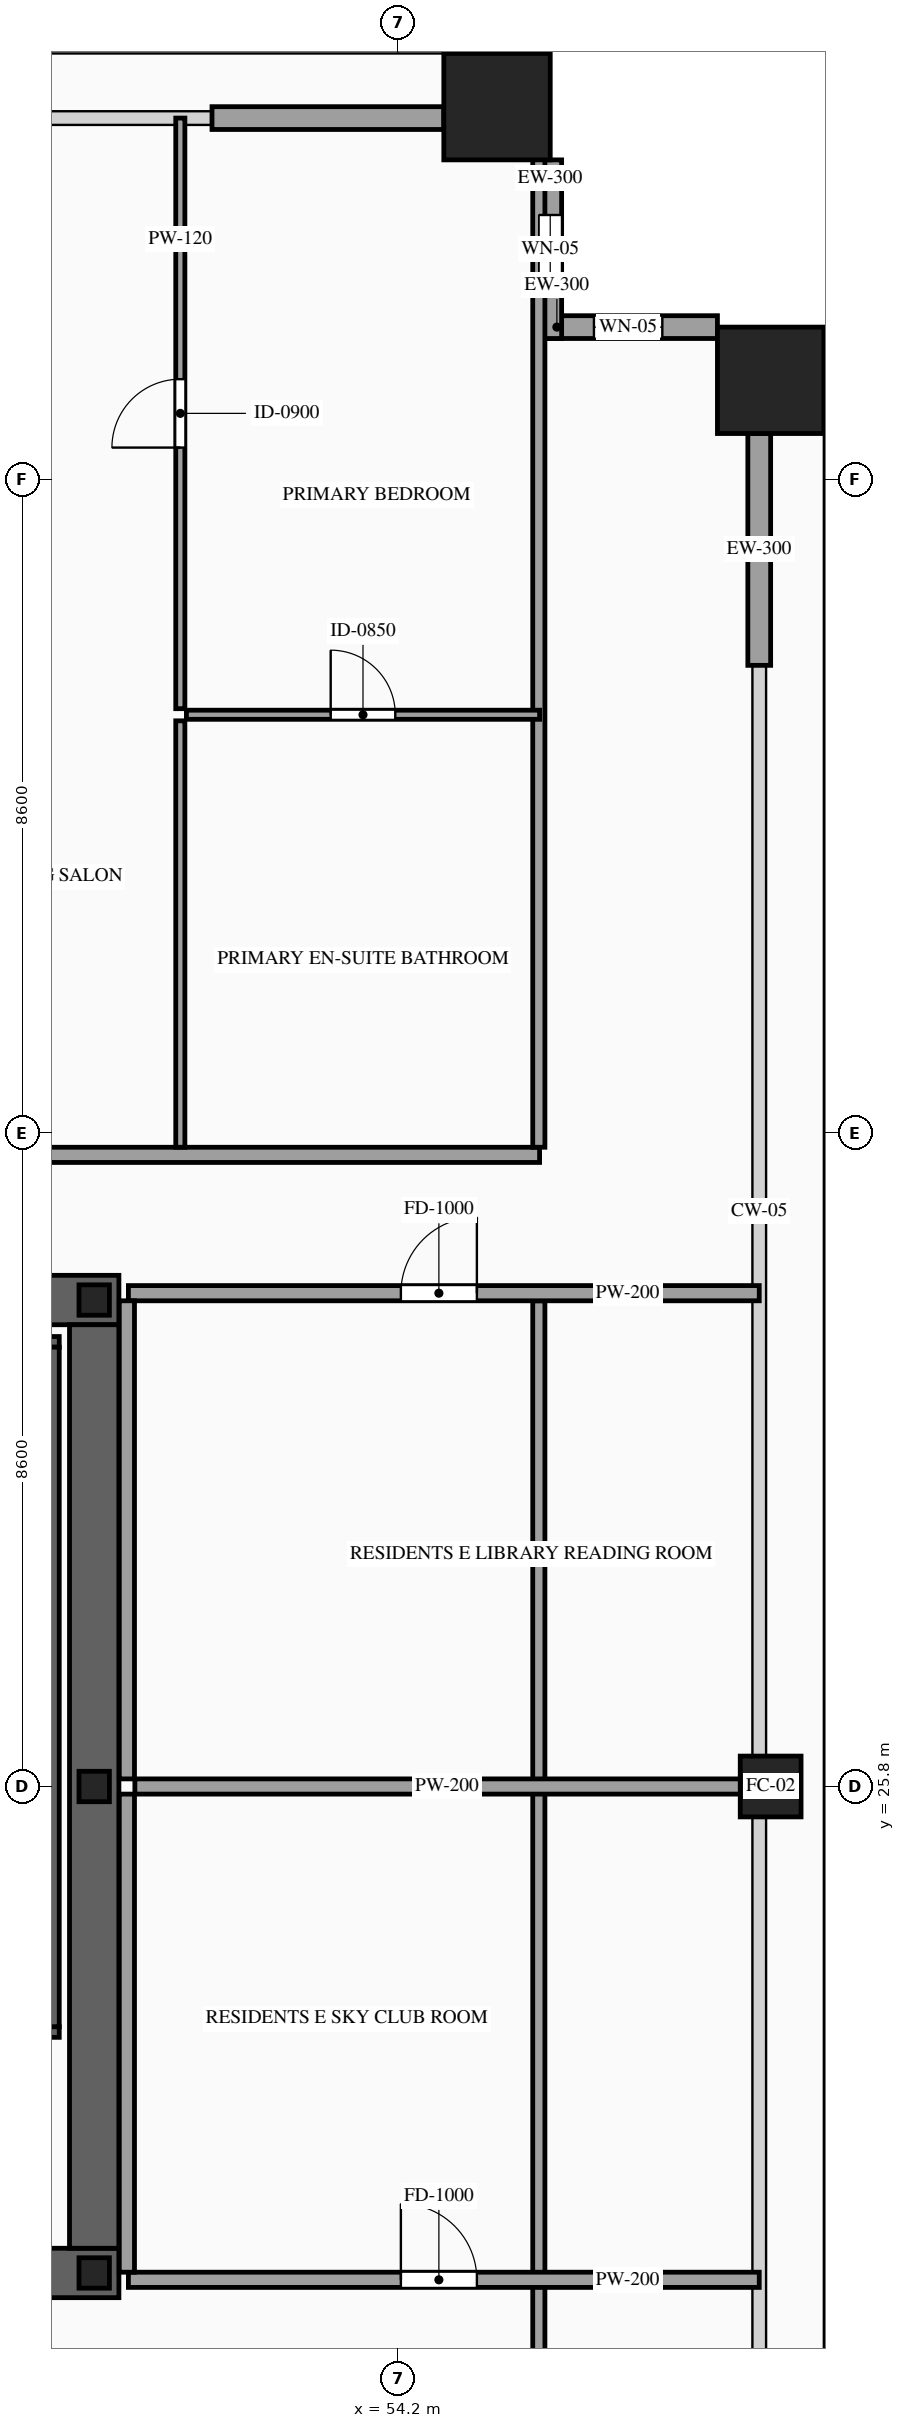
"""IFC4 building model, lengths in metres.
Left out: names, types, materials, properties, quantities, classifications, styles, units other than length and angle.
Written with IfcOpenShell. Run it as: python <this file> out.ifc"""

import sys

from ifc_helpers import new_model, si_unit, direction, frame, frame_2d, origin, origin_2d, place, context, subcontext, project, spatial, rectangle, hollow_rectangle, i_section, extrude, source, transform, mapped, element, fill, save


model = new_model("IFC4")
c1 = context("Model", 3, precision=1e-05, world=origin(), true_north=direction((0.0, 1.0)))
c2 = subcontext(c1, "Body", "Model", "MODEL_VIEW")
j1 = project(units=[si_unit("LENGTHUNIT", "METRE"), si_unit("PLANEANGLEUNIT", "RADIAN")], contexts=[c1])
p1 = place(None, origin())
s1 = spatial("IfcSite", under=j1, at=p1, CompositionType="ELEMENT")
p2 = place(p1, origin())
s2 = spatial("IfcBuilding", under=s1, at=p2, CompositionType="ELEMENT")
p3 = place(p2, frame((0.0, 0.0, 216.0)))
s3 = spatial("IfcBuildingStorey", under=s2, at=p3, CompositionType="ELEMENT", Elevation=216.0)
p4 = place(p3, frame((23.475, 19.4, 0.0), z_axis=(0.0, 0.0, 1.0), x_axis=(1.0, 0.0, 0.0)))
e1 = element("IfcWall", 1, at=p4, inside=s3, PredefinedType="SHEAR", context=c2, shape_type="SweptSolid", body=[
    extrude(rectangle(XDim=27.05, YDim=0.65, at=frame_2d((13.525, 0.0))), origin(), (0.0, 0.0, 1.0), 3.5),
])
p5 = place(p4, frame((1.975, 0.0, 0.0)))
e2 = element("IfcOpeningElement", 2, at=p5, cuts=e1, PredefinedType="OPENING", context=c2, shape_type="SweptSolid", body=[
    extrude(rectangle(XDim=1.1, YDim=2.2, at=frame_2d((0.55, 1.1))), frame((0.0, 0.34, 0.0), z_axis=(0.0, -1.0, 0.0), x_axis=(1.0, 0.0, 0.0)), (0.0, 0.0, 1.0), 0.68),
])
p6 = place(p4, frame((9.875, 0.0, 0.0)))
e3 = element("IfcOpeningElement", 3, at=p6, cuts=e1, PredefinedType="OPENING", context=c2, shape_type="SweptSolid", body=[
    extrude(rectangle(XDim=1.1, YDim=2.2, at=frame_2d((0.55, 1.1))), frame((0.0, 0.34, 0.0), z_axis=(0.0, -1.0, 0.0), x_axis=(1.0, 0.0, 0.0)), (0.0, 0.0, 1.0), 0.68),
])
p7 = place(p4, frame((23.075, 0.0, 0.0)))
e4 = element("IfcOpeningElement", 4, at=p7, cuts=e1, PredefinedType="OPENING", context=c2, shape_type="SweptSolid", body=[
    extrude(rectangle(XDim=1.1, YDim=2.2, at=frame_2d((0.55, 1.1))), frame((0.0, 0.34, 0.0), z_axis=(0.0, -1.0, 0.0), x_axis=(1.0, 0.0, 0.0)), (0.0, 0.0, 1.0), 0.68),
])
p8 = place(p4, frame((19.695, 0.0, 0.0)))
e5 = element("IfcOpeningElement", 5, at=p8, cuts=e1, PredefinedType="OPENING", context=c2, shape_type="SweptSolid", body=[
    extrude(rectangle(XDim=0.9, YDim=2.15, at=frame_2d((0.45, 1.075))), frame((0.0, 0.34, 0.0), z_axis=(0.0, -1.0, 0.0), x_axis=(1.0, 0.0, 0.0)), (0.0, 0.0, 1.0), 0.68),
])
p9 = place(p4, frame((18.255, 0.0, 0.0)))
e6 = element("IfcOpeningElement", 6, at=p9, cuts=e1, PredefinedType="OPENING", context=c2, shape_type="SweptSolid", body=[
    extrude(rectangle(XDim=0.9, YDim=2.15, at=frame_2d((0.45, 1.075))), frame((0.0, 0.34, 0.0), z_axis=(0.0, -1.0, 0.0), x_axis=(1.0, 0.0, 0.0)), (0.0, 0.0, 1.0), 0.68),
])
p10 = place(p3, frame((23.475, 32.2, 0.0), z_axis=(0.0, 0.0, 1.0), x_axis=(1.0, 0.0, 0.0)))
e7 = element("IfcWall", 7, at=p10, inside=s3, PredefinedType="SHEAR", context=c2, shape_type="SweptSolid", body=[
    extrude(rectangle(XDim=27.05, YDim=0.65, at=frame_2d((13.525, 0.0))), origin(), (0.0, 0.0, 1.0), 3.5),
])
p11 = place(p10, frame((4.595, 0.0, 0.0)))
e8 = element("IfcOpeningElement", 8, at=p11, cuts=e7, PredefinedType="OPENING", context=c2, shape_type="SweptSolid", body=[
    extrude(rectangle(XDim=0.9, YDim=2.15, at=frame_2d((0.45, 1.075))), frame((0.0, 0.34, 0.0), z_axis=(0.0, -1.0, 0.0), x_axis=(1.0, 0.0, 0.0)), (0.0, 0.0, 1.0), 0.68),
])
p12 = place(p10, frame((9.875, 0.0, 0.0)))
e9 = element("IfcOpeningElement", 9, at=p12, cuts=e7, PredefinedType="OPENING", context=c2, shape_type="SweptSolid", body=[
    extrude(rectangle(XDim=1.1, YDim=2.2, at=frame_2d((0.55, 1.1))), frame((0.0, 0.34, 0.0), z_axis=(0.0, -1.0, 0.0), x_axis=(1.0, 0.0, 0.0)), (0.0, 0.0, 1.0), 0.68),
])
p13 = place(p10, frame((15.725, 0.0, 0.0)))
e10 = element("IfcOpeningElement", 10, at=p13, cuts=e7, PredefinedType="OPENING", context=c2, shape_type="SweptSolid", body=[
    extrude(rectangle(XDim=1.1, YDim=2.2, at=frame_2d((0.55, 1.1))), frame((0.0, 0.34, 0.0), z_axis=(0.0, -1.0, 0.0), x_axis=(1.0, 0.0, 0.0)), (0.0, 0.0, 1.0), 0.68),
])
p14 = place(p10, frame((18.925, 0.0, 0.0)))
e11 = element("IfcOpeningElement", 11, at=p14, cuts=e7, PredefinedType="OPENING", context=c2, shape_type="SweptSolid", body=[
    extrude(rectangle(XDim=0.9, YDim=2.15, at=frame_2d((0.45, 1.075))), frame((0.0, 0.34, 0.0), z_axis=(0.0, -1.0, 0.0), x_axis=(1.0, 0.0, 0.0)), (0.0, 0.0, 1.0), 0.68),
])
m1 = source(origin(), c2, "Body", "SweptSolid", [
    extrude(rectangle(XDim=12.15, YDim=0.65, at=frame_2d((6.075, 0.0))), origin(), (0.0, 0.0, 1.0), 3.5),
])
p15 = place(p3, frame((50.2, 19.725, 0.0), z_axis=(0.0, 0.0, 1.0), x_axis=(0.0, 1.0, 0.0)))
e12 = element("IfcWall", 12, at=p15, inside=s3, PredefinedType="SHEAR", context=c2, shape_type="MappedRepresentation", body=[
    mapped(m1, transform((0.0, 0.0, 0.0), scale=1.0)),
])
m2 = source(origin(), c2, "Body", "SweptSolid", [
    extrude(i_section(OverallWidth=0.4, OverallDepth=0.4, WebThickness=0.013, FlangeThickness=0.021, at=origin_2d()), origin(), (0.0, 0.0, 1.0), 3.5),
])
for number, where, z_axis, x_axis in (
    (13, (50.2, 19.4, 0.0), (0.0, 0.0, 1.0), (1.0, 0.0, 0.0)),
    (14, (50.2, 25.8, 0.0), (0.0, 0.0, 1.0), (1.0, 0.0, 0.0)),
    (15, (50.2, 32.2, 0.0), (0.0, 0.0, 1.0), (1.0, 0.0, 0.0)),
):
    element("IfcColumn", number, at=place(p3, frame(where, z_axis=z_axis, x_axis=x_axis)), inside=s3, PredefinedType="COLUMN", context=c2, shape_type="MappedRepresentation", body=[
        mapped(m2, transform((0.0, 0.0, 0.0), scale=1.0)),
    ])
m3 = source(origin(), c2, "Body", "SweptSolid", [
    extrude(hollow_rectangle(XDim=1.4, YDim=1.4, WallThickness=0.06, at=origin_2d()), origin(), (0.0, 0.0, 1.0), 3.22),
])
p16 = place(p3, frame((55.5, 47.9, 0.0), z_axis=(0.0, 0.0, 1.0), x_axis=(1.0, 0.0, 0.0)))
e16 = element("IfcColumn", 16, at=p16, inside=s3, PredefinedType="COLUMN", context=c2, shape_type="MappedRepresentation", body=[
    mapped(m3, transform((0.0, 0.0, 0.0), scale=1.0)),
])
m4 = source(origin(), c2, "Body", "SweptSolid", [
    extrude(hollow_rectangle(XDim=0.8, YDim=0.8, WallThickness=0.036, at=origin_2d()), origin(), (0.0, 0.0, 1.0), 3.22),
])
p17 = place(p3, frame((59.1, 25.8, 0.0), z_axis=(0.0, 0.0, 1.0), x_axis=(1.0, 0.0, 0.0)))
e17 = element("IfcColumn", 17, at=p17, inside=s3, PredefinedType="COLUMN", context=c2, shape_type="MappedRepresentation", body=[
    mapped(m4, transform((0.0, 0.0, 0.0), scale=1.0)),
])
p18 = place(p3, frame((59.1, 44.3, 0.0), z_axis=(0.0, 0.0, 1.0), x_axis=(1.0, 0.0, 0.0)))
e18 = element("IfcColumn", 18, at=p18, inside=s3, PredefinedType="COLUMN", context=c2, shape_type="MappedRepresentation", body=[
    mapped(m3, transform((0.0, 0.0, 0.0), scale=1.0)),
])
p19 = place(p3, frame((58.4, 45.0, 0.0), z_axis=(0.0, 0.0, 1.0), x_axis=(-1.0, 0.0, 0.0)))
e19 = element("IfcWall", 19, at=p19, inside=s3, PredefinedType="SOLIDWALL", context=c2, shape_type="SweptSolid", body=[
    extrude(rectangle(XDim=2.35, YDim=0.3, at=frame_2d((1.175, 0.0))), origin(), (0.0, 0.0, 1.0), 3.22),
])
p20 = place(p19, frame((0.725, 0.0, 0.75)))
e20 = element("IfcOpeningElement", 20, at=p20, cuts=e19, PredefinedType="OPENING", context=c2, shape_type="SweptSolid", body=[
    extrude(rectangle(XDim=0.9, YDim=1.5, at=frame_2d((0.45, 0.75))), frame((0.0, 0.165, 0.0), z_axis=(0.0, -1.0, 0.0), x_axis=(1.0, 0.0, 0.0)), (0.0, 0.0, 1.0), 0.33),
])
p21 = place(p3, frame((56.2, 44.85, 0.0), z_axis=(0.0, 0.0, 1.0), x_axis=(0.0, 1.0, 0.0)))
e21 = element("IfcWall", 21, at=p21, inside=s3, PredefinedType="SOLIDWALL", context=c2, shape_type="SweptSolid", body=[
    extrude(rectangle(XDim=2.35, YDim=0.3, at=frame_2d((1.175, 0.0))), origin(), (0.0, 0.0, 1.0), 3.22),
])
p22 = place(p21, frame((0.725, 0.0, 0.75)))
e22 = element("IfcOpeningElement", 22, at=p22, cuts=e21, PredefinedType="OPENING", context=c2, shape_type="SweptSolid", body=[
    extrude(rectangle(XDim=0.9, YDim=1.5, at=frame_2d((0.45, 0.75))), frame((0.0, 0.165, 0.0), z_axis=(0.0, -1.0, 0.0), x_axis=(1.0, 0.0, 0.0)), (0.0, 0.0, 1.0), 0.33),
])
m5 = source(origin(), c2, "Body", "SweptSolid", [
    extrude(rectangle(XDim=3.05, YDim=0.3, at=frame_2d((1.525, 0.0))), origin(), (0.0, 0.0, 1.0), 2.775),
])
for number, where, z_axis, x_axis in (
    (23, (51.75, 47.75, 0.0), (0.0, 0.0, 1.0), (1.0, 0.0, 0.0)),
    (24, (58.95, 40.55, 0.0), (0.0, 0.0, 1.0), (0.0, 1.0, 0.0)),
):
    element("IfcWall", number, at=place(p3, frame(where, z_axis=z_axis, x_axis=x_axis)), inside=s3, PredefinedType="SOLIDWALL", context=c2, shape_type="MappedRepresentation", body=[
        mapped(m5, transform((0.0, 0.0, 0.0), scale=1.0)),
    ])
p23 = place(p3, frame((46.46, 22.57, 0.0), z_axis=(0.0, 0.0, 1.0), x_axis=(1.0, 0.0, 0.0)))
e25 = element("IfcWall", 25, at=p23, inside=s3, PredefinedType="SOLIDWALL", context=c2, shape_type="SweptSolid", body=[
    extrude(rectangle(XDim=3.28, YDim=0.14, at=frame_2d((1.64, 0.0))), origin(), (0.0, 0.0, 1.0), 3.22),
])
p24 = place(p23, frame((1.09, 0.0, 0.0)))
e26 = element("IfcOpeningElement", 26, at=p24, cuts=e25, PredefinedType="OPENING", context=c2, shape_type="SweptSolid", body=[
    extrude(rectangle(XDim=1.1, YDim=2.2, at=frame_2d((0.55, 1.1))), frame((0.0, 0.085, 0.0), z_axis=(0.0, -1.0, 0.0), x_axis=(1.0, 0.0, 0.0)), (0.0, 0.0, 1.0), 0.17),
])
m6 = source(origin(), c2, "Body", "SweptSolid", [
    extrude(rectangle(XDim=3.28, YDim=0.14, at=frame_2d((1.64, 0.0))), origin(), (0.0, 0.0, 1.0), 3.22),
])
p25 = place(p3, frame((46.46, 31.65, 0.0), z_axis=(0.0, 0.0, 1.0), x_axis=(1.0, 0.0, 0.0)))
e27 = element("IfcWall", 27, at=p25, inside=s3, PredefinedType="SOLIDWALL", context=c2, shape_type="MappedRepresentation", body=[
    mapped(m6, transform((0.0, 0.0, 0.0), scale=1.0)),
])
m7 = source(origin(), c2, "Body", "SweptSolid", [
    extrude(rectangle(XDim=8.94, YDim=0.14, at=frame_2d((4.47, 0.0))), origin(), (0.0, 0.0, 1.0), 3.22),
])
p26 = place(p3, frame((49.67, 22.64, 0.0), z_axis=(0.0, 0.0, 1.0), x_axis=(0.0, 1.0, 0.0)))
e28 = element("IfcWall", 28, at=p26, inside=s3, PredefinedType="SOLIDWALL", context=c2, shape_type="MappedRepresentation", body=[
    mapped(m7, transform((0.0, 0.0, 0.0), scale=1.0)),
])
p27 = place(p3, frame((36.318, 34.11, 0.0), z_axis=(0.0, 0.0, 1.0), x_axis=(1.0, 0.0, 0.0)))
e29 = element("IfcWall", 29, at=p27, inside=s3, PredefinedType="PARTITIONING", context=c2, shape_type="SweptSolid", body=[
    extrude(rectangle(XDim=19.742, YDim=0.2, at=frame_2d((9.871, 0.0))), origin(), (0.0, 0.0, 1.0), 3.22),
])
p28 = place(p27, frame((11.915, 0.0, 0.0)))
e30 = element("IfcOpeningElement", 30, at=p28, cuts=e29, PredefinedType="OPENING", context=c2, shape_type="SweptSolid", body=[
    extrude(rectangle(XDim=1.0, YDim=2.2, at=frame_2d((0.5, 1.1))), frame((0.0, 0.115, 0.0), z_axis=(0.0, -1.0, 0.0), x_axis=(1.0, 0.0, 0.0)), (0.0, 0.0, 1.0), 0.23),
])
m8 = source(origin(), c2, "Body", "SweptSolid", [
    extrude(rectangle(XDim=13.39, YDim=0.16, at=frame_2d((6.695, 0.0))), origin(), (0.0, 0.0, 1.0), 3.22),
])
p29 = place(p3, frame((56.05, 34.21, 0.0), z_axis=(0.0, 0.0, 1.0), x_axis=(0.0, 1.0, 0.0)))
e31 = element("IfcWall", 31, at=p29, inside=s3, PredefinedType="PARTITIONING", context=c2, shape_type="MappedRepresentation", body=[
    mapped(m8, transform((0.0, 0.0, 0.0), scale=1.0)),
])
p30 = place(p3, frame((51.413, 39.9, 0.0), z_axis=(0.0, 0.0, 1.0), x_axis=(1.0, 0.0, 0.0)))
e32 = element("IfcWall", 32, at=p30, inside=s3, PredefinedType="PARTITIONING", context=c2, shape_type="SweptSolid", body=[
    extrude(rectangle(XDim=4.647, YDim=0.12, at=frame_2d((2.323, 0.0))), origin(), (0.0, 0.0, 1.0), 3.22),
])
p31 = place(p30, frame((1.898, 0.0, 0.0)))
e33 = element("IfcOpeningElement", 33, at=p31, cuts=e32, PredefinedType="OPENING", context=c2, shape_type="SweptSolid", body=[
    extrude(rectangle(XDim=0.85, YDim=2.1, at=frame_2d((0.425, 1.05))), frame((0.0, 0.075, 0.0), z_axis=(0.0, -1.0, 0.0), x_axis=(1.0, 0.0, 0.0)), (0.0, 0.0, 1.0), 0.15),
])
m9 = source(origin(), c2, "Body", "SweptSolid", [
    extrude(rectangle(XDim=5.61, YDim=0.12, at=frame_2d((2.805, 0.0))), origin(), (0.0, 0.0, 1.0), 1.615),
])
p32 = place(p3, frame((51.333, 34.21, 0.0), z_axis=(0.0, 0.0, 1.0), x_axis=(0.0, 1.0, 0.0)))
e34 = element("IfcWall", 34, at=p32, inside=s3, PredefinedType="PARTITIONING", context=c2, shape_type="MappedRepresentation", body=[
    mapped(m9, transform((0.0, 0.0, 0.0), scale=1.0)),
])
p33 = place(p3, frame((51.333, 39.98, 0.0), z_axis=(0.0, 0.0, 1.0), x_axis=(0.0, 1.0, 0.0)))
e35 = element("IfcWall", 35, at=p33, inside=s3, PredefinedType="PARTITIONING", context=c2, shape_type="SweptSolid", body=[
    extrude(rectangle(XDim=7.77, YDim=0.12, at=frame_2d((3.885, 0.0))), origin(), (0.0, 0.0, 1.0), 3.22),
])
p34 = place(p33, frame((3.435, 0.0, 0.0)))
e36 = element("IfcOpeningElement", 36, at=p34, cuts=e35, PredefinedType="OPENING", context=c2, shape_type="SweptSolid", body=[
    extrude(rectangle(XDim=0.9, YDim=2.15, at=frame_2d((0.45, 1.075))), frame((0.0, 0.075, 0.0), z_axis=(0.0, -1.0, 0.0), x_axis=(1.0, 0.0, 0.0)), (0.0, 0.0, 1.0), 0.15),
])
m10 = source(origin(), c2, "Body", "SweptSolid", [
    extrude(rectangle(XDim=28.19, YDim=0.16, at=frame_2d((14.095, 0.0))), origin(), (0.0, 0.0, 1.0), 3.22),
])
p35 = place(p3, frame((56.05, 4.0, 0.0), z_axis=(0.0, 0.0, 1.0), x_axis=(0.0, 1.0, 0.0)))
e37 = element("IfcWall", 37, at=p35, inside=s3, PredefinedType="PARTITIONING", context=c2, shape_type="MappedRepresentation", body=[
    mapped(m10, transform((0.0, 0.0, 0.0), scale=1.0)),
])
p36 = place(p3, frame((50.65, 19.31, 0.0), z_axis=(0.0, 0.0, 1.0), x_axis=(1.0, 0.0, 0.0)))
e38 = element("IfcWall", 38, at=p36, inside=s3, PredefinedType="PARTITIONING", context=c2, shape_type="SweptSolid", body=[
    extrude(rectangle(XDim=8.3, YDim=0.2, at=frame_2d((4.15, 0.0))), origin(), (0.0, 0.0, 1.0), 3.22),
])
p37 = place(p36, frame((3.585, 0.0, 0.0)))
e39 = element("IfcOpeningElement", 39, at=p37, cuts=e38, PredefinedType="OPENING", context=c2, shape_type="SweptSolid", body=[
    extrude(rectangle(XDim=1.0, YDim=2.2, at=frame_2d((0.5, 1.1))), frame((0.0, 0.115, 0.0), z_axis=(0.0, -1.0, 0.0), x_axis=(1.0, 0.0, 0.0)), (0.0, 0.0, 1.0), 0.23),
])
m11 = source(origin(), c2, "Body", "SweptSolid", [
    extrude(rectangle(XDim=8.215, YDim=0.2, at=frame_2d((4.107, 0.0))), origin(), (0.0, 0.0, 1.0), 1.615),
])
p38 = place(p3, frame((50.735, 25.8, 0.0), z_axis=(0.0, 0.0, 1.0), x_axis=(1.0, 0.0, 0.0)))
e40 = element("IfcWall", 40, at=p38, inside=s3, PredefinedType="PARTITIONING", context=c2, shape_type="MappedRepresentation", body=[
    mapped(m11, transform((0.0, 0.0, 0.0), scale=1.0)),
])
m12 = source(origin(), c2, "Body", "SweptSolid", [
    extrude(rectangle(XDim=6.29, YDim=0.2, at=frame_2d((3.145, 0.0))), origin(), (0.0, 0.0, 1.0), 3.22),
])
p39 = place(p3, frame((50.63, 19.41, 0.0), z_axis=(0.0, 0.0, 1.0), x_axis=(0.0, 1.0, 0.0)))
e41 = element("IfcWall", 41, at=p39, inside=s3, PredefinedType="PARTITIONING", context=c2, shape_type="MappedRepresentation", body=[
    mapped(m12, transform((0.0, 0.0, 0.0), scale=1.0)),
])
p40 = place(p3, frame((50.65, 32.29, 0.0), z_axis=(0.0, 0.0, 1.0), x_axis=(1.0, 0.0, 0.0)))
e42 = element("IfcWall", 42, at=p40, inside=s3, PredefinedType="PARTITIONING", context=c2, shape_type="SweptSolid", body=[
    extrude(rectangle(XDim=8.3, YDim=0.2, at=frame_2d((4.15, 0.0))), origin(), (0.0, 0.0, 1.0), 3.22),
])
p41 = place(p40, frame((3.585, 0.0, 0.0)))
e43 = element("IfcOpeningElement", 43, at=p41, cuts=e42, PredefinedType="OPENING", context=c2, shape_type="SweptSolid", body=[
    extrude(rectangle(XDim=1.0, YDim=2.2, at=frame_2d((0.5, 1.1))), frame((0.0, 0.115, 0.0), z_axis=(0.0, -1.0, 0.0), x_axis=(1.0, 0.0, 0.0)), (0.0, 0.0, 1.0), 0.23),
])
p42 = place(p3, frame((50.63, 25.9, 0.0), z_axis=(0.0, 0.0, 1.0), x_axis=(0.0, 1.0, 0.0)))
e44 = element("IfcWall", 44, at=p42, inside=s3, PredefinedType="PARTITIONING", context=c2, shape_type="MappedRepresentation", body=[
    mapped(m12, transform((0.0, 0.0, 0.0), scale=1.0)),
])
m13 = source(origin(), c2, "Body", "SweptSolid", [
    extrude(rectangle(XDim=0.9, YDim=1.5, at=frame_2d((0.45, 0.75))), frame((0.0, 0.03, 0.0), z_axis=(0.0, -1.0, 0.0), x_axis=(1.0, 0.0, 0.0)), (0.0, 0.0, 1.0), 0.06),
])
p43 = place(p20, origin())
e45 = element("IfcWindow", 45, at=p43, inside=s3, PartitioningType="SINGLE_PANEL", PredefinedType="WINDOW", context=c2, shape_type="MappedRepresentation", body=[
    mapped(m13, transform((0.0, 0.0, 0.0), scale=1.0)),
])
fill(e20, e45)
p44 = place(p22, origin())
e46 = element("IfcWindow", 46, at=p44, inside=s3, PartitioningType="SINGLE_PANEL", PredefinedType="WINDOW", context=c2, shape_type="MappedRepresentation", body=[
    mapped(m13, transform((0.0, 0.0, 0.0), scale=1.0)),
])
fill(e22, e46)
m14 = source(origin(), c2, "Body", "SweptSolid", [
    extrude(rectangle(XDim=0.85, YDim=2.1, at=frame_2d((0.425, 1.05))), frame((0.0, 0.025, 0.0), z_axis=(0.0, -1.0, 0.0), x_axis=(1.0, 0.0, 0.0)), (0.0, 0.0, 1.0), 0.05),
])
p45 = place(p31, origin())
e47 = element("IfcDoor", 47, at=p45, inside=s3, OperationType="SINGLE_SWING_LEFT", PredefinedType="DOOR", context=c2, shape_type="MappedRepresentation", body=[
    mapped(m14, transform((0.0, 0.0, 0.0), scale=1.0)),
])
fill(e33, e47)
m15 = source(origin(), c2, "Body", "SweptSolid", [
    extrude(rectangle(XDim=0.9, YDim=2.15, at=frame_2d((0.45, 1.075))), frame((0.0, 0.025, 0.0), z_axis=(0.0, -1.0, 0.0), x_axis=(1.0, 0.0, 0.0)), (0.0, 0.0, 1.0), 0.05),
])
p46 = place(p34, origin())
e48 = element("IfcDoor", 48, at=p46, inside=s3, OperationType="SINGLE_SWING_LEFT", PredefinedType="DOOR", context=c2, shape_type="MappedRepresentation", body=[
    mapped(m15, transform((0.0, 0.0, 0.0), scale=1.0)),
])
fill(e36, e48)
m16 = source(origin(), c2, "Body", "SweptSolid", [
    extrude(rectangle(XDim=1.0, YDim=2.2, at=frame_2d((0.5, 1.1))), frame((0.0, 0.025, 0.0), z_axis=(0.0, -1.0, 0.0), x_axis=(1.0, 0.0, 0.0)), (0.0, 0.0, 1.0), 0.05),
])
p47 = place(p37, origin())
e49 = element("IfcDoor", 49, at=p47, inside=s3, OperationType="SINGLE_SWING_LEFT", PredefinedType="DOOR", context=c2, shape_type="MappedRepresentation", body=[
    mapped(m16, transform((0.0, 0.0, 0.0), scale=1.0)),
])
fill(e39, e49)
p48 = place(p41, origin())
e50 = element("IfcDoor", 50, at=p48, inside=s3, OperationType="SINGLE_SWING_RIGHT", PredefinedType="DOOR", context=c2, shape_type="MappedRepresentation", body=[
    mapped(m16, transform((0.0, 0.0, 0.0), scale=1.0)),
])
fill(e43, e50)
save(model, sys.argv[1])
